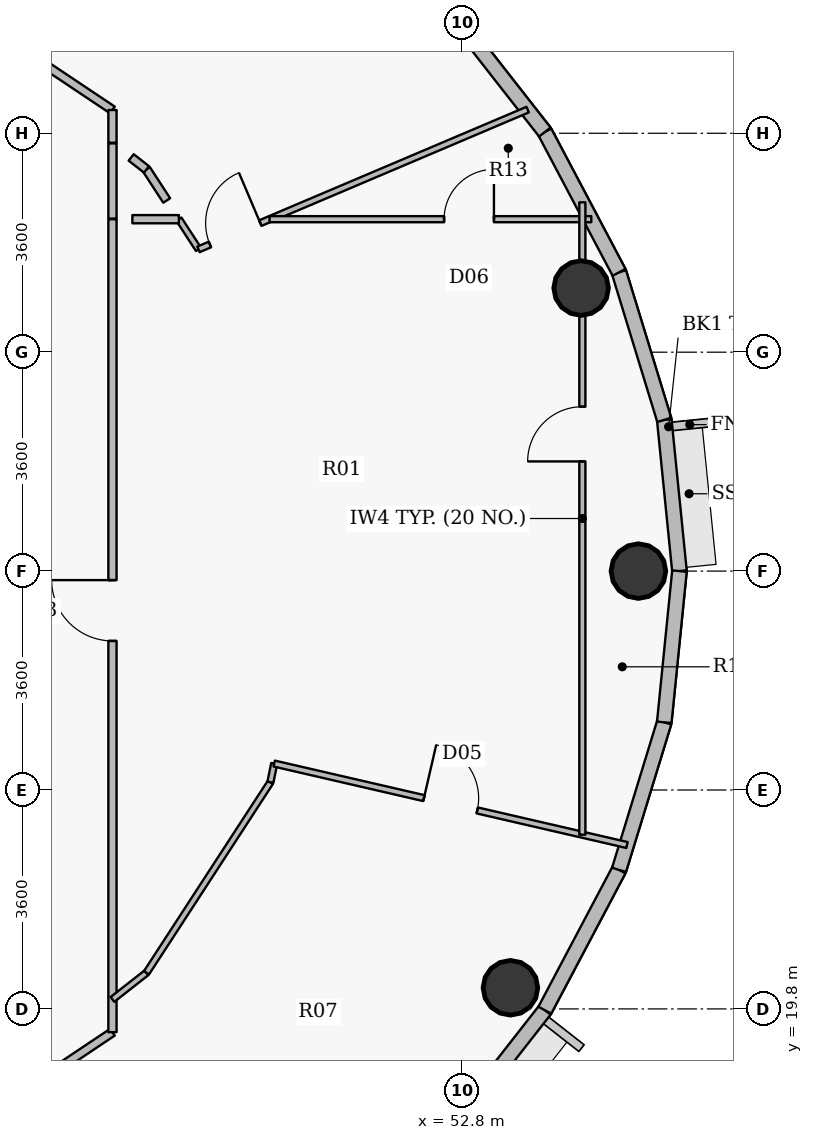
"""IFC4 building model, lengths in metres.
Left out: names, types, materials, properties, quantities, classifications, styles, units other than length and angle.
Written with IfcOpenShell. Run it as: python <this file> out.ifc"""

import sys

from ifc_helpers import new_model, si_unit, direction, frame, frame_2d, origin, origin_2d, place, context, subcontext, project, spatial, rectangle, hollow_circle, extrude, source, transform, mapped, element, fill, save


model = new_model("IFC4")
c1 = context("Model", 3, precision=1e-05, world=origin(), true_north=direction((0.0, 1.0)))
c2 = subcontext(c1, "Body", "Model", "MODEL_VIEW")
j1 = project(units=[si_unit("LENGTHUNIT", "METRE"), si_unit("PLANEANGLEUNIT", "RADIAN")], contexts=[c1])
p1 = place(None, origin())
s1 = spatial("IfcSite", under=j1, at=p1, CompositionType="ELEMENT")
p2 = place(p1, origin())
s2 = spatial("IfcBuilding", under=s1, at=p2, CompositionType="ELEMENT")
p3 = place(p2, frame((0.0, 0.0, 343.0)))
s3 = spatial("IfcBuildingStorey", under=s2, at=p3, CompositionType="ELEMENT", Elevation=343.0)
for number, where, z_axis, x_axis in (
    (1, (55.7, 27.0, 0.0), (0.0, 0.0, 1.0), (1.0, 0.0, 0.0)),
    (2, (54.758, 31.655, 0.0), (0.0, 0.0, 1.0), (1.0, 0.0, 0.0)),
    (3, (53.595, 20.147, 0.0), (0.0, 0.0, 1.0), (1.0, 0.0, 0.0)),
):
    element("IfcColumn", number, at=place(p3, frame(where, z_axis=z_axis, x_axis=x_axis)), inside=s3, PredefinedType="COLUMN", context=c2, shape_type="SweptSolid", body=[
        extrude(hollow_circle(Radius=0.45, WallThickness=0.028, at=origin_2d()), origin(), (0.0, 0.0, 1.0), 3.8),
    ])
p4 = place(p3, frame((56.125, 29.487, 0.0), z_axis=(0.0, 0.0, 1.0), x_axis=(0.100025963401, -0.994984827344, 0.0)))
e4 = element("IfcWall", 4, at=p4, inside=s3, PredefinedType="SOLIDWALL", context=c2, shape_type="SweptSolid", body=[
    extrude(rectangle(XDim=2.499, YDim=0.24, at=frame_2d((1.25, 0.0))), origin(), (0.0, 0.0, 1.0), 3.5),
])
p5 = place(p3, frame((55.381, 31.913, 0.0), z_axis=(0.0, 0.0, 1.0), x_axis=(0.293105547213, -0.956080089842, 0.0)))
e5 = element("IfcWall", 5, at=p5, inside=s3, PredefinedType="SOLIDWALL", context=c2, shape_type="SweptSolid", body=[
    extrude(rectangle(XDim=2.538, YDim=0.24, at=frame_2d((1.269, 0.0))), origin(), (0.0, 0.0, 1.0), 1.685),
])
p6 = place(p3, frame((54.161, 34.221, 0.0), z_axis=(0.0, 0.0, 1.0), x_axis=(0.467487999989, -0.883999417345, 0.0)))
e6 = element("IfcWall", 6, at=p6, inside=s3, PredefinedType="SOLIDWALL", context=c2, shape_type="SweptSolid", body=[
    extrude(rectangle(XDim=2.61, YDim=0.24, at=frame_2d((1.305, 0.0))), origin(), (0.0, 0.0, 1.0), 1.685),
])
p7 = place(p3, frame((52.493, 36.352, 0.0), z_axis=(0.0, 0.0, 1.0), x_axis=(0.616286367698, -0.78752213492, 0.0)))
e7 = element("IfcWall", 7, at=p7, inside=s3, PredefinedType="SOLIDWALL", context=c2, shape_type="SweptSolid", body=[
    extrude(rectangle(XDim=2.706, YDim=0.24, at=frame_2d((1.353, 0.0))), origin(), (0.0, 0.0, 1.0), 3.5),
])
p8 = place(p3, frame((54.161, 19.779, 0.0), z_axis=(0.0, 0.0, 1.0), x_axis=(-0.616286367698, -0.78752213492, 0.0)))
e8 = element("IfcWall", 8, at=p8, inside=s3, PredefinedType="SOLIDWALL", context=c2, shape_type="SweptSolid", body=[
    extrude(rectangle(XDim=2.706, YDim=0.24, at=frame_2d((1.353, 0.0))), origin(), (0.0, 0.0, 1.0), 1.685),
])
p9 = place(p3, frame((55.381, 22.087, 0.0), z_axis=(0.0, 0.0, 1.0), x_axis=(-0.467487999989, -0.883999417345, 0.0)))
e9 = element("IfcWall", 9, at=p9, inside=s3, PredefinedType="SOLIDWALL", context=c2, shape_type="SweptSolid", body=[
    extrude(rectangle(XDim=2.61, YDim=0.24, at=frame_2d((1.305, 0.0))), origin(), (0.0, 0.0, 1.0), 1.685),
])
p10 = place(p3, frame((56.125, 24.513, 0.0), z_axis=(0.0, 0.0, 1.0), x_axis=(-0.293105547213, -0.956080089842, 0.0)))
e10 = element("IfcWall", 10, at=p10, inside=s3, PredefinedType="SOLIDWALL", context=c2, shape_type="SweptSolid", body=[
    extrude(rectangle(XDim=2.538, YDim=0.24, at=frame_2d((1.269, 0.0))), origin(), (0.0, 0.0, 1.0), 3.5),
])
p11 = place(p3, frame((56.375, 27.0, 0.0), z_axis=(0.0, 0.0, 1.0), x_axis=(-0.100025963401, -0.994984827344, 0.0)))
e11 = element("IfcWall", 11, at=p11, inside=s3, PredefinedType="SOLIDWALL", context=c2, shape_type="SweptSolid", body=[
    extrude(rectangle(XDim=2.499, YDim=0.24, at=frame_2d((1.25, 0.0))), origin(), (0.0, 0.0, 1.0), 3.5),
])
for number, where, z_axis, x_axis in (
    (12, (45.541, 18.408, 0.0), (0.0, 0.0, 1.0), (0.831, 0.556, 0.0)),
    (13, (45.541, 35.592, 0.0), (0.0, 0.0, 1.0), (0.831, -0.556, 0.0)),
):
    element("IfcWall", number, at=place(p3, frame(where, z_axis=z_axis, x_axis=x_axis)), inside=s3, PredefinedType="PARTITIONING", context=c2, shape_type="SweptSolid", body=[
        extrude(rectangle(XDim=1.815, YDim=0.135, at=frame_2d((0.908, 0.0))), origin(), (0.0, 0.0, 1.0), 2.285),
    ])
p12 = place(p3, frame((47.05, 19.417, 0.0), z_axis=(0.0, 0.0, 1.0), x_axis=(0.0, 1.0, 0.0)))
e14 = element("IfcWall", 14, at=p12, inside=s3, PredefinedType="PARTITIONING", context=c2, shape_type="SweptSolid", body=[
    extrude(rectangle(XDim=13.37, YDim=0.135, at=frame_2d((6.685, 0.0))), origin(), (0.0, 0.0, 1.0), 2.25),
])
p13 = place(p12, frame((6.434, 0.0, 0.0)))
e15 = element("IfcOpeningElement", 15, at=p13, cuts=e14, PredefinedType="OPENING", context=c2, shape_type="SweptSolid", body=[
    extrude(rectangle(XDim=1.0, YDim=2.15, at=origin_2d()), frame((0.5, 0.078, 1.075), z_axis=(0.0, -1.0, 0.0), x_axis=(1.0, 0.0, 0.0)), (0.0, 0.0, 1.0), 0.155),
])
p14 = place(p3, frame((47.05, 19.956, 0.0), z_axis=(0.0, 0.0, 1.0), x_axis=(0.787164110493, 0.616743595956, 0.0)))
e16 = element("IfcWall", 16, at=p14, inside=s3, PredefinedType="PARTITIONING", context=c2, shape_type="SweptSolid", body=[
    extrude(rectangle(XDim=0.71, YDim=0.1, at=frame_2d((0.355, 0.0))), origin(), (0.0, 0.0, 1.0), 2.25),
])
p15 = place(p3, frame((47.05, 34.044, 0.0), z_axis=(0.0, 0.0, 1.0), x_axis=(0.0, 1.0, 0.0)))
e17 = element("IfcWall", 17, at=p15, inside=s3, PredefinedType="PARTITIONING", context=c2, shape_type="SweptSolid", body=[
    extrude(rectangle(XDim=0.539, YDim=0.135, at=frame_2d((0.269, 0.0))), origin(), (0.0, 0.0, 1.0), 3.5),
])
p16 = place(p3, frame((47.609, 20.394, 0.0), z_axis=(0.0, 0.0, 1.0), x_axis=(0.545364838352, 0.838198778983, 0.0)))
e18 = element("IfcWall", 18, at=p16, inside=s3, PredefinedType="PARTITIONING", context=c2, shape_type="SweptSolid", body=[
    extrude(rectangle(XDim=3.738, YDim=0.1, at=frame_2d((1.869, 0.0))), origin(), (0.0, 0.0, 1.0), 2.25),
])
p17 = place(p3, frame((48.142, 32.787, 0.0), z_axis=(0.0, 0.0, 1.0), x_axis=(0.545336289771, -0.838217353112, 0.0)))
e19 = element("IfcWall", 19, at=p17, inside=s3, PredefinedType="PARTITIONING", context=c2, shape_type="SweptSolid", body=[
    extrude(rectangle(XDim=0.592, YDim=0.1, at=frame_2d((0.296, 0.0))), origin(), (0.0, 0.0, 1.0), 3.5),
])
p18 = place(p3, frame((48.465, 32.291, 0.0), z_axis=(0.0, 0.0, 1.0), x_axis=(0.920507145492, 0.390725728739, 0.0)))
e20 = element("IfcWall", 20, at=p18, inside=s3, PredefinedType="PARTITIONING", context=c2, shape_type="SweptSolid", body=[
    extrude(rectangle(XDim=5.882, YDim=0.1, at=frame_2d((2.941, 0.0))), origin(), (0.0, 0.0, 1.0), 2.985),
])
p19 = place(p18, frame((0.205, 0.0, 0.0)))
e21 = element("IfcOpeningElement", 21, at=p19, cuts=e20, PredefinedType="OPENING", context=c2, shape_type="SweptSolid", body=[
    extrude(rectangle(XDim=0.9, YDim=2.1, at=origin_2d()), frame((0.45, 0.06, 1.05), z_axis=(0.0, -1.0, 0.0), x_axis=(1.0, 0.0, 0.0)), (0.0, 0.0, 1.0), 0.12),
])
p20 = place(p3, frame((49.634, 32.787, 0.0), z_axis=(0.0, 0.0, 1.0), x_axis=(1.0, 0.0, 0.0)))
e22 = element("IfcWall", 22, at=p20, inside=s3, PredefinedType="PARTITIONING", context=c2, shape_type="SweptSolid", body=[
    extrude(rectangle(XDim=5.291, YDim=0.1, at=frame_2d((2.645, 0.0))), origin(), (0.0, 0.0, 1.0), 2.985),
])
p21 = place(p20, frame((2.87, 0.0, 0.0)))
e23 = element("IfcOpeningElement", 23, at=p21, cuts=e22, PredefinedType="OPENING", context=c2, shape_type="SweptSolid", body=[
    extrude(rectangle(XDim=0.82, YDim=2.1, at=origin_2d()), frame((0.41, 0.06, 1.05), z_axis=(0.0, -1.0, 0.0), x_axis=(1.0, 0.0, 0.0)), (0.0, 0.0, 1.0), 0.12),
])
p22 = place(p3, frame((49.648, 23.527, 0.0), z_axis=(0.0, 0.0, 1.0), x_axis=(0.198359507495, 0.980129331153, 0.0)))
e24 = element("IfcWall", 24, at=p22, inside=s3, PredefinedType="PARTITIONING", context=c2, shape_type="SweptSolid", body=[
    extrude(rectangle(XDim=0.314, YDim=0.1, at=frame_2d((0.157, 0.0))), origin(), (0.0, 0.0, 1.0), 3.5),
])
p23 = place(p3, frame((49.71, 23.835, 0.0), z_axis=(0.0, 0.0, 1.0), x_axis=(0.974373225384, -0.224937363847, 0.0)))
e25 = element("IfcWall", 25, at=p23, inside=s3, PredefinedType="PARTITIONING", context=c2, shape_type="SweptSolid", body=[
    extrude(rectangle(XDim=5.954, YDim=0.1, at=frame_2d((2.977, 0.0))), origin(), (0.0, 0.0, 1.0), 2.985),
])
p24 = place(p23, frame((2.527, 0.0, 0.0)))
e26 = element("IfcOpeningElement", 26, at=p24, cuts=e25, PredefinedType="OPENING", context=c2, shape_type="SweptSolid", body=[
    extrude(rectangle(XDim=0.9, YDim=2.1, at=origin_2d()), frame((0.45, 0.06, 1.05), z_axis=(0.0, -1.0, 0.0), x_axis=(1.0, 0.0, 0.0)), (0.0, 0.0, 1.0), 0.12),
])
p25 = place(p3, frame((54.778, 22.665, 0.0), z_axis=(0.0, 0.0, 1.0), x_axis=(0.0, 1.0, 0.0)))
e27 = element("IfcWall", 27, at=p25, inside=s3, PredefinedType="PARTITIONING", context=c2, shape_type="SweptSolid", body=[
    extrude(rectangle(XDim=10.4, YDim=0.1, at=frame_2d((5.2, 0.0))), origin(), (0.0, 0.0, 1.0), 2.25),
])
p26 = place(p25, frame((6.139, 0.0, 0.0)))
e28 = element("IfcOpeningElement", 28, at=p26, cuts=e27, PredefinedType="OPENING", context=c2, shape_type="SweptSolid", body=[
    extrude(rectangle(XDim=0.9, YDim=2.1, at=origin_2d()), frame((0.45, 0.06, 1.05), z_axis=(0.0, -1.0, 0.0), x_axis=(1.0, 0.0, 0.0)), (0.0, 0.0, 1.0), 0.12),
])
p27 = place(p3, frame((47.05, 34.034, 0.0), z_axis=(0.0, 0.0, 1.0), x_axis=(0.0, -1.0, 0.0)))
e29 = element("IfcWall", 29, at=p27, inside=s3, PredefinedType="PARTITIONING", context=c2, shape_type="SweptSolid", body=[
    extrude(rectangle(XDim=1.237, YDim=0.135, at=frame_2d((0.618, 0.0))), origin(), (0.0, 0.0, 1.0), 3.5),
])
p28 = place(p3, frame((47.377, 32.787, 0.0), z_axis=(0.0, 0.0, 1.0), x_axis=(1.0, 0.0, 0.0)))
e30 = element("IfcWall", 30, at=p28, inside=s3, PredefinedType="PARTITIONING", context=c2, shape_type="SweptSolid", body=[
    extrude(rectangle(XDim=0.765, YDim=0.135, at=frame_2d((0.382, 0.0))), origin(), (0.0, 0.0, 1.0), 3.5),
])
p29 = place(p3, frame((47.942, 33.094, 0.0), z_axis=(0.0, 0.0, 1.0), x_axis=(-0.545522826825, 0.838095964322, 0.0)))
e31 = element("IfcWall", 31, at=p29, inside=s3, PredefinedType="PARTITIONING", context=c2, shape_type="SweptSolid", body=[
    extrude(rectangle(XDim=0.61, YDim=0.135, at=frame_2d((0.305, 0.0))), origin(), (0.0, 0.0, 1.0), 3.5),
])
p30 = place(p3, frame((47.609, 33.606, 0.0), z_axis=(0.0, 0.0, 1.0), x_axis=(-0.787376183758, 0.616472826043, 0.0)))
e32 = element("IfcWall", 32, at=p30, inside=s3, PredefinedType="PARTITIONING", context=c2, shape_type="SweptSolid", body=[
    extrude(rectangle(XDim=0.32, YDim=0.135, at=frame_2d((0.16, 0.0))), origin(), (0.0, 0.0, 1.0), 3.5),
])
m1 = source(origin(), c2, "Body", "SweptSolid", [
    extrude(rectangle(XDim=1.0, YDim=2.15, at=origin_2d()), frame((0.5, 0.025, 1.075), z_axis=(0.0, -1.0, 0.0), x_axis=(1.0, 0.0, 0.0)), (0.0, 0.0, 1.0), 0.05),
])
p31 = place(p13, origin())
e33 = element("IfcDoor", 33, at=p31, inside=s3, OperationType="SINGLE_SWING_RIGHT", PredefinedType="DOOR", context=c2, shape_type="MappedRepresentation", body=[
    mapped(m1, transform((0.0, 0.0, 0.0), x_axis=(1.0, 0.0, 0.0), y_axis=(0.0, 1.0, 0.0), z_axis=(0.0, 0.0, 1.0), scale=1.0)),
])
fill(e15, e33)
m2 = source(origin(), c2, "Body", "SweptSolid", [
    extrude(rectangle(XDim=0.9, YDim=2.1, at=origin_2d()), frame((0.45, 0.025, 1.05), z_axis=(0.0, -1.0, 0.0), x_axis=(1.0, 0.0, 0.0)), (0.0, 0.0, 1.0), 0.05),
])
p32 = place(p24, origin())
e34 = element("IfcDoor", 34, at=p32, inside=s3, OperationType="SINGLE_SWING_LEFT", PredefinedType="DOOR", context=c2, shape_type="MappedRepresentation", body=[
    mapped(m2, transform((0.0, 0.0, 0.0), x_axis=(1.0, 0.0, 0.0), y_axis=(0.0, 1.0, 0.0), z_axis=(0.0, 0.0, 1.0), scale=1.0)),
])
fill(e26, e34)
p33 = place(p19, origin())
e35 = element("IfcDoor", 35, at=p33, inside=s3, OperationType="SINGLE_SWING_RIGHT", PredefinedType="DOOR", context=c2, shape_type="MappedRepresentation", body=[
    mapped(m2, transform((0.0, 0.0, 0.0), x_axis=(1.0, 0.0, 0.0), y_axis=(0.0, 1.0, 0.0), z_axis=(0.0, 0.0, 1.0), scale=1.0)),
])
fill(e21, e35)
m3 = source(origin(), c2, "Body", "SweptSolid", [
    extrude(rectangle(XDim=0.82, YDim=2.1, at=origin_2d()), frame((0.41, 0.025, 1.05), z_axis=(0.0, -1.0, 0.0), x_axis=(1.0, 0.0, 0.0)), (0.0, 0.0, 1.0), 0.05),
])
p34 = place(p21, origin())
e36 = element("IfcDoor", 36, at=p34, inside=s3, OperationType="SINGLE_SWING_RIGHT", PredefinedType="DOOR", context=c2, shape_type="MappedRepresentation", body=[
    mapped(m3, transform((0.0, 0.0, 0.0), x_axis=(1.0, 0.0, 0.0), y_axis=(0.0, 1.0, 0.0), z_axis=(0.0, 0.0, 1.0), scale=1.0)),
])
fill(e23, e36)
p35 = place(p26, origin())
e37 = element("IfcDoor", 37, at=p35, inside=s3, OperationType="SINGLE_SWING_LEFT", PredefinedType="DOOR", context=c2, shape_type="MappedRepresentation", body=[
    mapped(m2, transform((0.0, 0.0, 0.0), x_axis=(1.0, 0.0, 0.0), y_axis=(0.0, 1.0, 0.0), z_axis=(0.0, 0.0, 1.0), scale=1.0)),
])
fill(e28, e37)
save(model, sys.argv[1])
